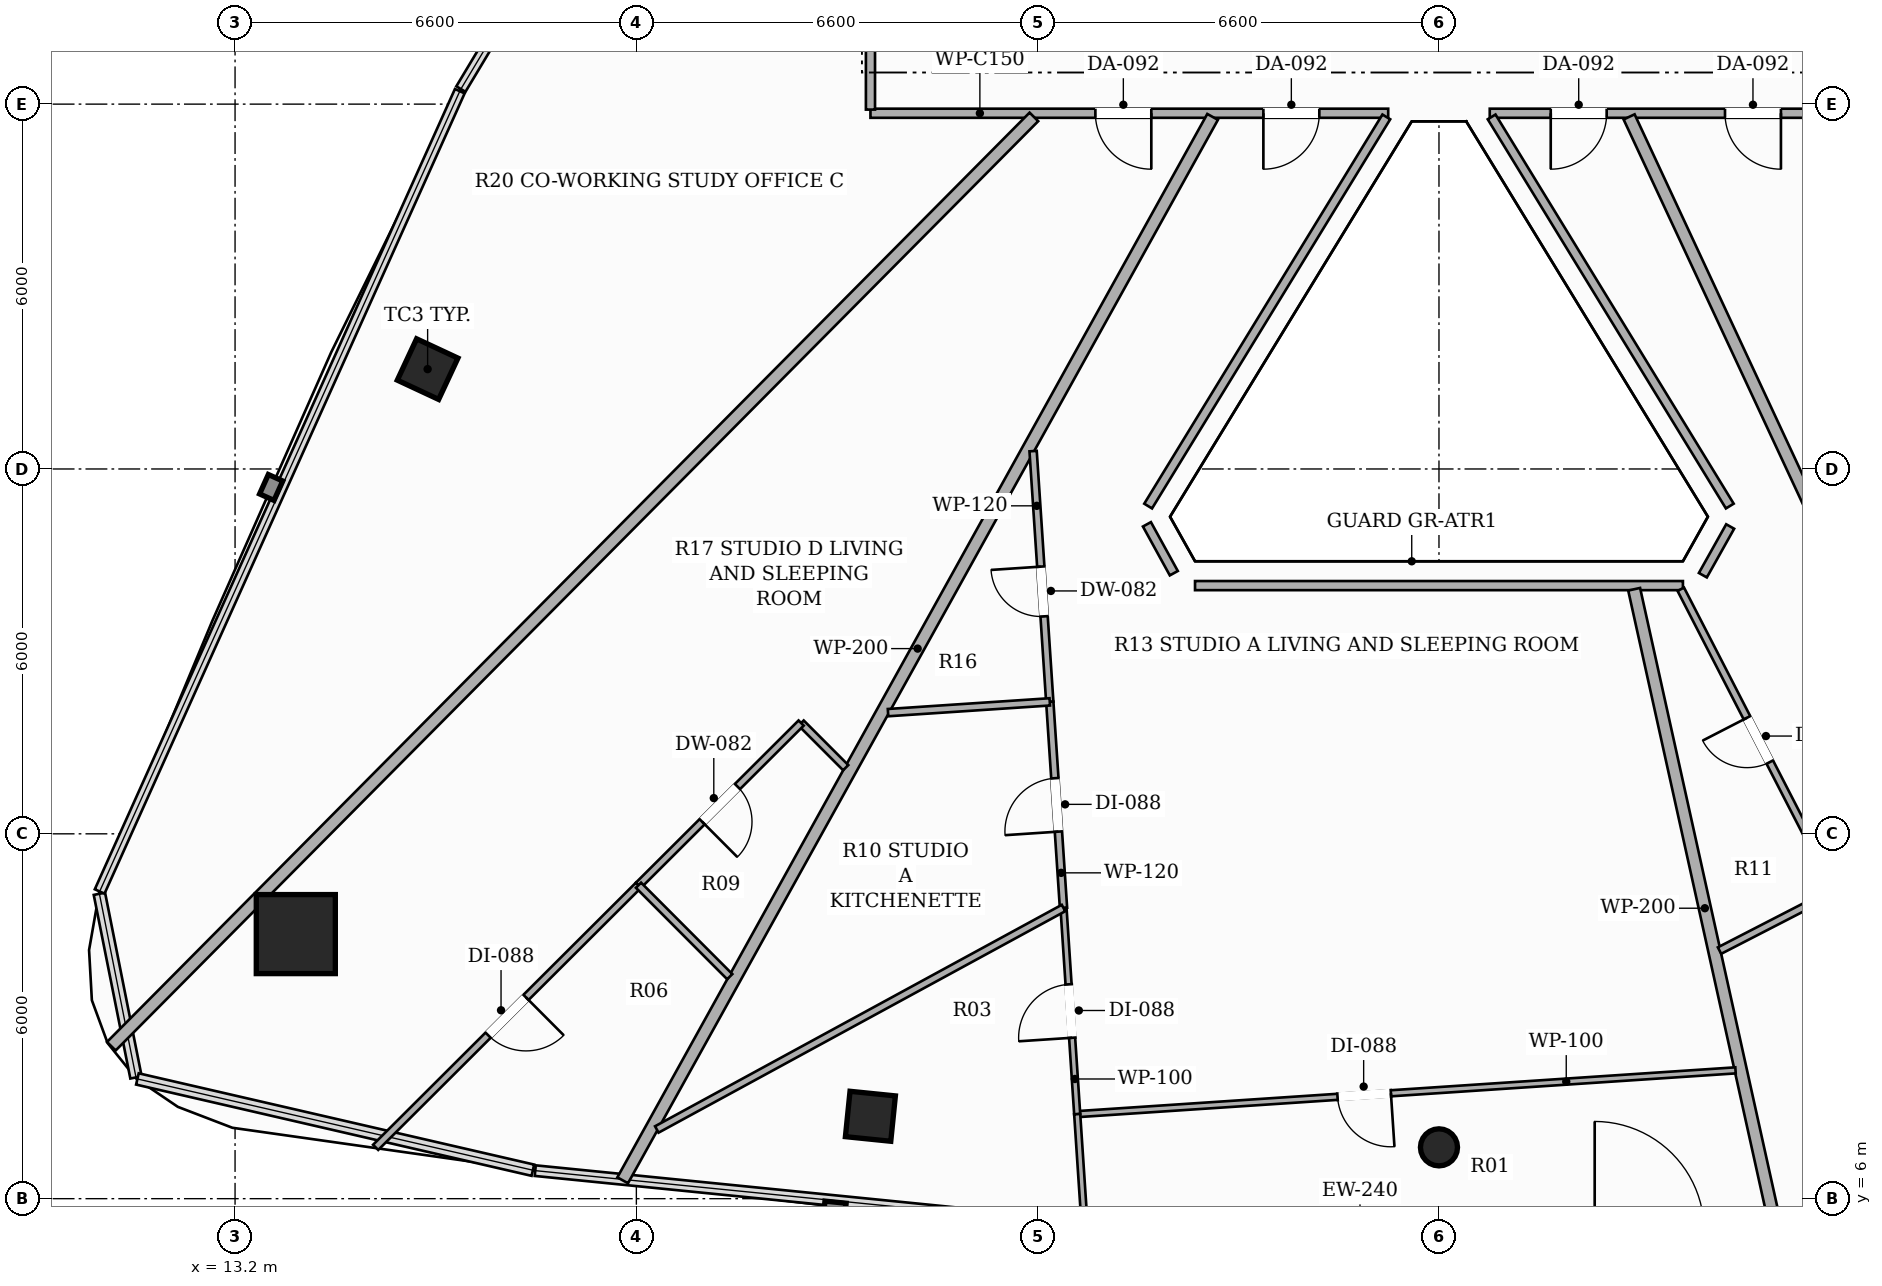
"""IFC4 building model, lengths in metres.
Left out: names, types, materials, properties, quantities, classifications, styles, units other than length and angle.
Written with IfcOpenShell. Run it as: python <this file> out.ifc"""

import sys

from ifc_helpers import new_model, si_unit, direction, frame, frame_2d, origin, origin_2d, place, context, subcontext, project, spatial, rectangle, hollow_rectangle, hollow_circle, extrude, element, fill, save


model = new_model("IFC4")
c1 = context("Model", 3, precision=1e-05, world=origin(), true_north=direction((0.0, 1.0)))
c2 = subcontext(c1, "Body", "Model", "MODEL_VIEW")
j1 = project(units=[si_unit("LENGTHUNIT", "METRE"), si_unit("PLANEANGLEUNIT", "RADIAN")], contexts=[c1])
p1 = place(None, origin())
s1 = spatial("IfcSite", under=j1, at=p1, CompositionType="ELEMENT")
p2 = place(p1, origin())
s2 = spatial("IfcBuilding", under=s1, at=p2, CompositionType="ELEMENT")
p3 = place(p2, frame((0.0, 0.0, 250.25)))
s3 = spatial("IfcBuildingStorey", under=s2, at=p3, CompositionType="ELEMENT", Elevation=250.25)
p4 = place(p3, frame((14.199, 10.351, 0.0), z_axis=(0.0, 0.0, 1.0), x_axis=(1.0, 0.0, 0.0)))
e1 = element("IfcColumn", 1, at=p4, inside=s3, PredefinedType="COLUMN", context=c2, shape_type="SweptSolid", body=[
    extrude(hollow_rectangle(XDim=1.3, YDim=1.3, WallThickness=0.04, at=origin_2d()), origin(), (0.0, 0.0, 1.0), 3.3),
])
for number, where, z_axis, x_axis in (
    (2, (16.367, 19.642, 0.0), (0.0, 0.0, 1.0), (0.423, 0.906, 0.0)),
    (3, (23.649, 7.355, 0.0), (0.0, 0.0, 1.0), (-0.995, 0.101, 0.0)),
):
    element("IfcColumn", number, at=place(p3, frame(where, z_axis=z_axis, x_axis=x_axis)), inside=s3, PredefinedType="COLUMN", context=c2, shape_type="SweptSolid", body=[
        extrude(hollow_rectangle(XDim=0.75, YDim=0.75, WallThickness=0.025, at=origin_2d()), origin(), (0.0, 0.0, 1.0), 3.3),
    ])
p5 = place(p3, frame((33.0, 6.844, 0.0), z_axis=(0.0, 0.0, 1.0), x_axis=(1.0, 0.0, 0.0)))
e4 = element("IfcColumn", 4, at=p5, inside=s3, PredefinedType="COLUMN", context=c2, shape_type="SweptSolid", body=[
    extrude(hollow_circle(Radius=0.305, WallThickness=0.016, at=origin_2d()), origin(), (0.0, 0.0, 1.0), 3.3),
])
p6 = place(p3, frame((32.165, 23.85, 0.0), z_axis=(0.0, 0.0, 1.0), x_axis=(-1.0, 0.0, 0.0)))
e5 = element("IfcWall", 5, at=p6, inside=s3, PredefinedType="PARTITIONING", context=c2, shape_type="SweptSolid", body=[
    extrude(rectangle(XDim=8.515, YDim=0.15, at=frame_2d((4.258, 0.0))), origin(), (0.0, 0.0, 1.0), 2.565),
])
p7 = place(p6, frame((1.133, 0.0, 0.0)))
e6 = element("IfcOpeningElement", 6, at=p7, cuts=e5, PredefinedType="OPENING", context=c2, shape_type="SweptSolid", body=[
    extrude(rectangle(XDim=0.92, YDim=2.15, at=frame_2d((0.46, 1.075))), frame((0.0, 0.085, 0.0), z_axis=(0.0, -1.0, 0.0), x_axis=(1.0, 0.0, 0.0)), (0.0, 0.0, 1.0), 0.17),
])
p8 = place(p6, frame((3.896, 0.0, 0.0)))
e7 = element("IfcOpeningElement", 7, at=p8, cuts=e5, PredefinedType="OPENING", context=c2, shape_type="SweptSolid", body=[
    extrude(rectangle(XDim=0.92, YDim=2.15, at=frame_2d((0.46, 1.075))), frame((0.0, 0.085, 0.0), z_axis=(0.0, -1.0, 0.0), x_axis=(1.0, 0.0, 0.0)), (0.0, 0.0, 1.0), 0.17),
])
p9 = place(p3, frame((23.65, 23.91, 0.0), z_axis=(0.0, 0.0, 1.0), x_axis=(0.0, 1.0, 0.0)))
e8 = element("IfcWall", 8, at=p9, inside=s3, PredefinedType="PARTITIONING", context=c2, shape_type="SweptSolid", body=[
    extrude(rectangle(XDim=11.059, YDim=0.15, at=frame_2d((5.53, 0.0))), origin(), (0.0, 0.0, 1.0), 2.492),
])
p10 = place(p9, frame((5.09, 0.0, 0.0)))
e9 = element("IfcOpeningElement", 9, at=p10, cuts=e8, PredefinedType="OPENING", context=c2, shape_type="SweptSolid", body=[
    extrude(rectangle(XDim=0.88, YDim=2.1, at=frame_2d((0.44, 1.05))), frame((0.0, 0.085, 0.0), z_axis=(0.0, -1.0, 0.0), x_axis=(1.0, 0.0, 0.0)), (0.0, 0.0, 1.0), 0.17),
])
p11 = place(p3, frame((42.19, 23.85, 0.0), z_axis=(0.0, 0.0, 1.0), x_axis=(-1.0, 0.0, 0.0)))
e10 = element("IfcWall", 10, at=p11, inside=s3, PredefinedType="PARTITIONING", context=c2, shape_type="SweptSolid", body=[
    extrude(rectangle(XDim=8.355, YDim=0.15, at=frame_2d((4.177, 0.0))), origin(), (0.0, 0.0, 1.0), 2.565),
])
p12 = place(p11, frame((0.2, 0.0, 0.0)))
e11 = element("IfcOpeningElement", 11, at=p12, cuts=e10, PredefinedType="OPENING", context=c2, shape_type="SweptSolid", body=[
    extrude(rectangle(XDim=0.92, YDim=2.15, at=frame_2d((0.46, 1.075))), frame((0.0, 0.085, 0.0), z_axis=(0.0, -1.0, 0.0), x_axis=(1.0, 0.0, 0.0)), (0.0, 0.0, 1.0), 0.17),
])
p13 = place(p11, frame((3.566, 0.0, 0.0)))
e12 = element("IfcOpeningElement", 12, at=p13, cuts=e10, PredefinedType="OPENING", context=c2, shape_type="SweptSolid", body=[
    extrude(rectangle(XDim=0.92, YDim=2.15, at=frame_2d((0.46, 1.075))), frame((0.0, 0.085, 0.0), z_axis=(0.0, -1.0, 0.0), x_axis=(1.0, 0.0, 0.0)), (0.0, 0.0, 1.0), 0.17),
])
p14 = place(p11, frame((6.432, 0.0, 0.0)))
e13 = element("IfcOpeningElement", 13, at=p14, cuts=e10, PredefinedType="OPENING", context=c2, shape_type="SweptSolid", body=[
    extrude(rectangle(XDim=0.92, YDim=2.15, at=frame_2d((0.46, 1.075))), frame((0.0, 0.085, 0.0), z_axis=(0.0, -1.0, 0.0), x_axis=(1.0, 0.0, 0.0)), (0.0, 0.0, 1.0), 0.17),
])
p15 = place(p3, frame((33.866, 23.79, 0.0), z_axis=(0.0, 0.0, 1.0), x_axis=(0.522011859837, -0.852938226479, 0.0)))
e14 = element("IfcWall", 14, at=p15, inside=s3, PredefinedType="PARTITIONING", context=c2, shape_type="SweptSolid", body=[
    extrude(rectangle(XDim=7.504, YDim=0.15, at=frame_2d((3.752, 0.0))), origin(), (0.0, 0.0, 1.0), 2.773),
])
p16 = place(p3, frame((37.789, 17.054, 0.0), z_axis=(0.0, 0.0, 1.0), x_axis=(-0.488935266506, -0.872320070368, 0.0)))
e15 = element("IfcWall", 15, at=p16, inside=s3, PredefinedType="PARTITIONING", context=c2, shape_type="SweptSolid", body=[
    extrude(rectangle(XDim=0.918, YDim=0.15, at=frame_2d((0.459, 0.0))), origin(), (0.0, 0.0, 1.0), 3.06),
])
p17 = place(p3, frame((37.012, 16.082, 0.0), z_axis=(0.0, 0.0, 1.0), x_axis=(-1.0, 0.0, 0.0)))
e16 = element("IfcWall", 16, at=p17, inside=s3, PredefinedType="PARTITIONING", context=c2, shape_type="SweptSolid", body=[
    extrude(rectangle(XDim=8.024, YDim=0.15, at=frame_2d((4.012, 0.0))), origin(), (0.0, 0.0, 1.0), 2.773),
])
p18 = place(p3, frame((28.639, 16.286, 0.0), z_axis=(0.0, 0.0, 1.0), x_axis=(-0.481571453054, 0.876406832244, 0.0)))
e17 = element("IfcWall", 17, at=p18, inside=s3, PredefinedType="PARTITIONING", context=c2, shape_type="SweptSolid", body=[
    extrude(rectangle(XDim=0.918, YDim=0.15, at=frame_2d((0.459, 0.0))), origin(), (0.0, 0.0, 1.0), 3.06),
])
p19 = place(p3, frame((28.217, 17.39, 0.0), z_axis=(0.0, 0.0, 1.0), x_axis=(0.522011859837, 0.852938226479, 0.0)))
e18 = element("IfcWall", 18, at=p19, inside=s3, PredefinedType="PARTITIONING", context=c2, shape_type="SweptSolid", body=[
    extrude(rectangle(XDim=7.504, YDim=0.15, at=frame_2d((3.752, 0.0))), origin(), (0.0, 0.0, 1.0), 2.773),
])
p20 = place(p3, frame((19.575, 6.302, 0.0), z_axis=(0.0, 0.0, 1.0), x_axis=(0.485129783088, 0.874442161358, 0.0)))
e19 = element("IfcWall", 19, at=p20, inside=s3, PredefinedType="PARTITIONING", context=c2, shape_type="SweptSolid", body=[
    extrude(rectangle(XDim=19.999, YDim=0.2, at=frame_2d((10.0, 0.0))), origin(), (0.0, 0.0, 1.0), 2.492),
])
p21 = place(p3, frame((36.21, 16.022, 0.0), z_axis=(0.0, 0.0, 1.0), x_axis=(0.216451711791, -0.976293325012, 0.0)))
e20 = element("IfcWall", 20, at=p21, inside=s3, PredefinedType="PARTITIONING", context=c2, shape_type="SweptSolid", body=[
    extrude(rectangle(XDim=10.746, YDim=0.2, at=frame_2d((5.373, 0.0))), origin(), (0.0, 0.0, 1.0), 2.492),
])
p22 = place(p3, frame((26.338, 23.79, 0.0), z_axis=(0.0, 0.0, 1.0), x_axis=(-0.70454576136, -0.70965855885, 0.0)))
e21 = element("IfcWall", 21, at=p22, inside=s3, PredefinedType="PARTITIONING", context=c2, shape_type="SweptSolid", body=[
    extrude(rectangle(XDim=21.536, YDim=0.2, at=frame_2d((10.768, 0.0))), origin(), (0.0, 0.0, 1.0), 2.492),
])
p23 = place(p3, frame((44.391, 6.058, 0.0), z_axis=(0.0, 0.0, 1.0), x_axis=(-0.422434507673, 0.906393450289, 0.0)))
e22 = element("IfcWall", 22, at=p23, inside=s3, PredefinedType="PARTITIONING", context=c2, shape_type="SweptSolid", body=[
    extrude(rectangle(XDim=19.563, YDim=0.2, at=frame_2d((9.782, 0.0))), origin(), (0.0, 0.0, 1.0), 2.492),
])
p24 = place(p3, frame((26.599, 14.17, 0.0), z_axis=(0.0, 0.0, 1.0), x_axis=(-0.066334744758, 0.997797425151, 0.0)))
e23 = element("IfcWall", 23, at=p24, inside=s3, PredefinedType="PARTITIONING", context=c2, shape_type="SweptSolid", body=[
    extrude(rectangle(XDim=4.133, YDim=0.12, at=frame_2d((2.066, 0.0))), origin(), (0.0, 0.0, 1.0), 2.773),
])
p25 = place(p24, frame((1.409, 0.0, 0.0)))
e24 = element("IfcOpeningElement", 24, at=p25, cuts=e23, PredefinedType="OPENING", context=c2, shape_type="SweptSolid", body=[
    extrude(rectangle(XDim=0.82, YDim=2.1, at=frame_2d((0.41, 1.05))), frame((0.0, 0.07, 0.0), z_axis=(0.0, -1.0, 0.0), x_axis=(1.0, 0.0, 0.0)), (0.0, 0.0, 1.0), 0.14),
])
p26 = place(p3, frame((26.825, 10.78, 0.0), z_axis=(0.0, 0.0, 1.0), x_axis=(-0.066471315173, 0.997788336402, 0.0)))
e25 = element("IfcWall", 25, at=p26, inside=s3, PredefinedType="PARTITIONING", context=c2, shape_type="SweptSolid", body=[
    extrude(rectangle(XDim=3.397, YDim=0.12, at=frame_2d((1.699, 0.0))), origin(), (0.0, 0.0, 1.0), 3.06),
])
p27 = place(p26, frame((1.259, 0.0, 0.0)))
e26 = element("IfcOpeningElement", 26, at=p27, cuts=e25, PredefinedType="OPENING", context=c2, shape_type="SweptSolid", body=[
    extrude(rectangle(XDim=0.88, YDim=2.1, at=frame_2d((0.44, 1.05))), frame((0.0, 0.07, 0.0), z_axis=(0.0, -1.0, 0.0), x_axis=(1.0, 0.0, 0.0)), (0.0, 0.0, 1.0), 0.14),
])
p28 = place(p3, frame((37.877, 8.11, 0.0), z_axis=(0.0, 0.0, 1.0), x_axis=(-0.997794804299, -0.066374155471, 0.0)))
e27 = element("IfcWall", 27, at=p28, inside=s3, PredefinedType="PARTITIONING", context=c2, shape_type="SweptSolid", body=[
    extrude(rectangle(XDim=10.851, YDim=0.1, at=frame_2d((5.425, 0.0))), origin(), (0.0, 0.0, 1.0), 2.492),
])
p29 = place(p28, frame((5.68, 0.0, 0.0)))
e28 = element("IfcOpeningElement", 28, at=p29, cuts=e27, PredefinedType="OPENING", context=c2, shape_type="SweptSolid", body=[
    extrude(rectangle(XDim=0.88, YDim=2.1, at=frame_2d((0.44, 1.05))), frame((0.0, 0.06, 0.0), z_axis=(0.0, -1.0, 0.0), x_axis=(1.0, 0.0, 0.0)), (0.0, 0.0, 1.0), 0.12),
])
p30 = place(p3, frame((27.05, 7.39, 0.0), z_axis=(0.0, 0.0, 1.0), x_axis=(-0.066251929929, 0.997802927326, 0.0)))
e29 = element("IfcWall", 29, at=p30, inside=s3, PredefinedType="PARTITIONING", context=c2, shape_type="SweptSolid", body=[
    extrude(rectangle(XDim=3.398, YDim=0.1, at=frame_2d((1.699, 0.0))), origin(), (0.0, 0.0, 1.0), 2.492),
])
p31 = place(p30, frame((1.259, 0.0, 0.0)))
e30 = element("IfcOpeningElement", 30, at=p31, cuts=e29, PredefinedType="OPENING", context=c2, shape_type="SweptSolid", body=[
    extrude(rectangle(XDim=0.88, YDim=2.1, at=frame_2d((0.44, 1.05))), frame((0.0, 0.06, 0.0), z_axis=(0.0, -1.0, 0.0), x_axis=(1.0, 0.0, 0.0)), (0.0, 0.0, 1.0), 0.12),
])
p32 = place(p3, frame((26.599, 14.17, 0.0), z_axis=(0.0, 0.0, 1.0), x_axis=(-0.99779365881, -0.066391373223, 0.0)))
e31 = element("IfcWall", 31, at=p32, inside=s3, PredefinedType="PARTITIONING", context=c2, shape_type="SweptSolid", body=[
    extrude(rectangle(XDim=2.666, YDim=0.12, at=frame_2d((1.333, 0.0))), origin(), (0.0, 0.0, 1.0), 2.773),
])
p33 = place(p3, frame((26.825, 10.78, 0.0), z_axis=(0.0, 0.0, 1.0), x_axis=(-0.87825059366, -0.478200684583, 0.0)))
e32 = element("IfcWall", 32, at=p33, inside=s3, PredefinedType="PARTITIONING", context=c2, shape_type="SweptSolid", body=[
    extrude(rectangle(XDim=7.616, YDim=0.12, at=frame_2d((3.808, 0.0))), origin(), (0.0, 0.0, 1.0), 2.492),
])
p34 = place(p3, frame((27.172, 5.554, 0.0), z_axis=(0.0, 0.0, 1.0), x_axis=(-0.066342877953, 0.997796884413, 0.0)))
e33 = element("IfcWall", 33, at=p34, inside=s3, PredefinedType="PARTITIONING", context=c2, shape_type="SweptSolid", body=[
    extrude(rectangle(XDim=1.84, YDim=0.1, at=frame_2d((0.92, 0.0))), origin(), (0.0, 0.0, 1.0), 2.492),
])
p35 = place(p3, frame((23.243, 13.088, 0.0), z_axis=(0.0, 0.0, 1.0), x_axis=(-0.706518163511, 0.707694909286, 0.0)))
e34 = element("IfcWall", 34, at=p35, inside=s3, PredefinedType="PARTITIONING", context=c2, shape_type="SweptSolid", body=[
    extrude(rectangle(XDim=1.037, YDim=0.12, at=frame_2d((0.519, 0.0))), origin(), (0.0, 0.0, 1.0), 3.06),
])
p36 = place(p3, frame((22.51, 13.822, 0.0), z_axis=(0.0, 0.0, 1.0), x_axis=(-0.708172404385, -0.706039549649, 0.0)))
e35 = element("IfcWall", 35, at=p36, inside=s3, PredefinedType="PARTITIONING", context=c2, shape_type="SweptSolid", body=[
    extrude(rectangle(XDim=3.777, YDim=0.12, at=frame_2d((1.889, 0.0))), origin(), (0.0, 0.0, 1.0), 2.773),
])
p37 = place(p36, frame((1.479, 0.0, 0.0)))
e36 = element("IfcOpeningElement", 36, at=p37, cuts=e35, PredefinedType="OPENING", context=c2, shape_type="SweptSolid", body=[
    extrude(rectangle(XDim=0.82, YDim=2.1, at=frame_2d((0.41, 1.05))), frame((0.0, 0.07, 0.0), z_axis=(0.0, -1.0, 0.0), x_axis=(1.0, 0.0, 0.0)), (0.0, 0.0, 1.0), 0.14),
])
p38 = place(p3, frame((19.835, 11.155, 0.0), z_axis=(0.0, 0.0, 1.0), x_axis=(-0.708085833798, -0.706126371108, 0.0)))
e37 = element("IfcWall", 37, at=p38, inside=s3, PredefinedType="PARTITIONING", context=c2, shape_type="SweptSolid", body=[
    extrude(rectangle(XDim=6.105, YDim=0.12, at=frame_2d((3.053, 0.0))), origin(), (0.0, 0.0, 1.0), 2.492),
])
p39 = place(p38, frame((2.613, 0.0, 0.0)))
e38 = element("IfcOpeningElement", 38, at=p39, cuts=e37, PredefinedType="OPENING", context=c2, shape_type="SweptSolid", body=[
    extrude(rectangle(XDim=0.88, YDim=2.1, at=frame_2d((0.44, 1.05))), frame((0.0, 0.07, 0.0), z_axis=(0.0, -1.0, 0.0), x_axis=(1.0, 0.0, 0.0)), (0.0, 0.0, 1.0), 0.14),
])
p40 = place(p3, frame((21.336, 9.651, 0.0), z_axis=(0.0, 0.0, 1.0), x_axis=(-0.70635958505, 0.707853188597, 0.0)))
e39 = element("IfcWall", 39, at=p40, inside=s3, PredefinedType="PARTITIONING", context=c2, shape_type="SweptSolid", body=[
    extrude(rectangle(XDim=2.125, YDim=0.12, at=frame_2d((1.062, 0.0))), origin(), (0.0, 0.0, 1.0), 2.773),
])
p41 = place(p3, frame((39.529, 11.066, 0.0), z_axis=(0.0, 0.0, 1.0), x_axis=(-0.457798211716, 0.889056127221, 0.0)))
e40 = element("IfcWall", 40, at=p41, inside=s3, PredefinedType="PARTITIONING", context=c2, shape_type="SweptSolid", body=[
    extrude(rectangle(XDim=5.574, YDim=0.12, at=frame_2d((2.787, 0.0))), origin(), (0.0, 0.0, 1.0), 2.773),
])
p42 = place(p41, frame((2.377, 0.0, 0.0)))
e41 = element("IfcOpeningElement", 41, at=p42, cuts=e40, PredefinedType="OPENING", context=c2, shape_type="SweptSolid", body=[
    extrude(rectangle(XDim=0.82, YDim=2.1, at=frame_2d((0.41, 1.05))), frame((0.0, 0.07, 0.0), z_axis=(0.0, -1.0, 0.0), x_axis=(1.0, 0.0, 0.0)), (0.0, 0.0, 1.0), 0.14),
])
p43 = place(p3, frame((39.529, 11.066, 0.0), z_axis=(0.0, 0.0, 1.0), x_axis=(-0.889105964634, -0.457701413207, 0.0)))
e42 = element("IfcWall", 42, at=p43, inside=s3, PredefinedType="PARTITIONING", context=c2, shape_type="SweptSolid", body=[
    extrude(rectangle(XDim=2.154, YDim=0.12, at=frame_2d((1.077, 0.0))), origin(), (0.0, 0.0, 1.0), 2.773),
])
p44 = place(p7, origin())
e43 = element("IfcDoor", 43, at=p44, inside=s3, OperationType="SINGLE_SWING_RIGHT", PredefinedType="DOOR", context=c2, shape_type="SweptSolid", body=[
    extrude(rectangle(XDim=0.92, YDim=2.15, at=frame_2d((0.46, 1.075))), frame((0.0, 0.025, 0.0), z_axis=(0.0, -1.0, 0.0), x_axis=(1.0, 0.0, 0.0)), (0.0, 0.0, 1.0), 0.05),
])
fill(e6, e43)
p45 = place(p25, origin())
e44 = element("IfcDoor", 44, at=p45, inside=s3, OperationType="SINGLE_SWING_RIGHT", PredefinedType="DOOR", context=c2, shape_type="SweptSolid", body=[
    extrude(rectangle(XDim=0.82, YDim=2.1, at=frame_2d((0.41, 1.05))), frame((0.0, 0.025, 0.0), z_axis=(0.0, -1.0, 0.0), x_axis=(1.0, 0.0, 0.0)), (0.0, 0.0, 1.0), 0.05),
])
fill(e24, e44)
p46 = place(p27, origin())
e45 = element("IfcDoor", 45, at=p46, inside=s3, OperationType="SINGLE_SWING_LEFT", PredefinedType="DOOR", context=c2, shape_type="SweptSolid", body=[
    extrude(rectangle(XDim=0.88, YDim=2.1, at=frame_2d((0.44, 1.05))), frame((0.0, 0.025, 0.0), z_axis=(0.0, -1.0, 0.0), x_axis=(1.0, 0.0, 0.0)), (0.0, 0.0, 1.0), 0.05),
])
fill(e26, e45)
p47 = place(p29, origin())
e46 = element("IfcDoor", 46, at=p47, inside=s3, OperationType="SINGLE_SWING_LEFT", PredefinedType="DOOR", context=c2, shape_type="SweptSolid", body=[
    extrude(rectangle(XDim=0.88, YDim=2.1, at=frame_2d((0.44, 1.05))), frame((0.0, 0.025, 0.0), z_axis=(0.0, -1.0, 0.0), x_axis=(1.0, 0.0, 0.0)), (0.0, 0.0, 1.0), 0.05),
])
fill(e28, e46)
p48 = place(p31, origin())
e47 = element("IfcDoor", 47, at=p48, inside=s3, OperationType="SINGLE_SWING_LEFT", PredefinedType="DOOR", context=c2, shape_type="SweptSolid", body=[
    extrude(rectangle(XDim=0.88, YDim=2.1, at=frame_2d((0.44, 1.05))), frame((0.0, 0.025, 0.0), z_axis=(0.0, -1.0, 0.0), x_axis=(1.0, 0.0, 0.0)), (0.0, 0.0, 1.0), 0.05),
])
fill(e30, e47)
p49 = place(p8, origin())
e48 = element("IfcDoor", 48, at=p49, inside=s3, OperationType="SINGLE_SWING_LEFT", PredefinedType="DOOR", context=c2, shape_type="SweptSolid", body=[
    extrude(rectangle(XDim=0.92, YDim=2.15, at=frame_2d((0.46, 1.075))), frame((0.0, 0.025, 0.0), z_axis=(0.0, -1.0, 0.0), x_axis=(1.0, 0.0, 0.0)), (0.0, 0.0, 1.0), 0.05),
])
fill(e7, e48)
p50 = place(p37, origin())
e49 = element("IfcDoor", 49, at=p50, inside=s3, OperationType="SINGLE_SWING_RIGHT", PredefinedType="DOOR", context=c2, shape_type="SweptSolid", body=[
    extrude(rectangle(XDim=0.82, YDim=2.1, at=frame_2d((0.41, 1.05))), frame((0.0, 0.025, 0.0), z_axis=(0.0, -1.0, 0.0), x_axis=(1.0, 0.0, 0.0)), (0.0, 0.0, 1.0), 0.05),
])
fill(e36, e49)
p51 = place(p39, origin())
e50 = element("IfcDoor", 50, at=p51, inside=s3, OperationType="SINGLE_SWING_LEFT", PredefinedType="DOOR", context=c2, shape_type="SweptSolid", body=[
    extrude(rectangle(XDim=0.88, YDim=2.1, at=frame_2d((0.44, 1.05))), frame((0.0, 0.025, 0.0), z_axis=(0.0, -1.0, 0.0), x_axis=(1.0, 0.0, 0.0)), (0.0, 0.0, 1.0), 0.05),
])
fill(e38, e50)
p52 = place(p13, origin())
e51 = element("IfcDoor", 51, at=p52, inside=s3, OperationType="SINGLE_SWING_LEFT", PredefinedType="DOOR", context=c2, shape_type="SweptSolid", body=[
    extrude(rectangle(XDim=0.92, YDim=2.15, at=frame_2d((0.46, 1.075))), frame((0.0, 0.025, 0.0), z_axis=(0.0, -1.0, 0.0), x_axis=(1.0, 0.0, 0.0)), (0.0, 0.0, 1.0), 0.05),
])
fill(e12, e51)
p53 = place(p14, origin())
e52 = element("IfcDoor", 52, at=p53, inside=s3, OperationType="SINGLE_SWING_RIGHT", PredefinedType="DOOR", context=c2, shape_type="SweptSolid", body=[
    extrude(rectangle(XDim=0.92, YDim=2.15, at=frame_2d((0.46, 1.075))), frame((0.0, 0.025, 0.0), z_axis=(0.0, -1.0, 0.0), x_axis=(1.0, 0.0, 0.0)), (0.0, 0.0, 1.0), 0.05),
])
fill(e13, e52)
p54 = place(p42, origin())
e53 = element("IfcDoor", 53, at=p54, inside=s3, OperationType="SINGLE_SWING_RIGHT", PredefinedType="DOOR", context=c2, shape_type="SweptSolid", body=[
    extrude(rectangle(XDim=0.82, YDim=2.1, at=frame_2d((0.41, 1.05))), frame((0.0, 0.025, 0.0), z_axis=(0.0, -1.0, 0.0), x_axis=(1.0, 0.0, 0.0)), (0.0, 0.0, 1.0), 0.05),
])
fill(e41, e53)
save(model, sys.argv[1])
